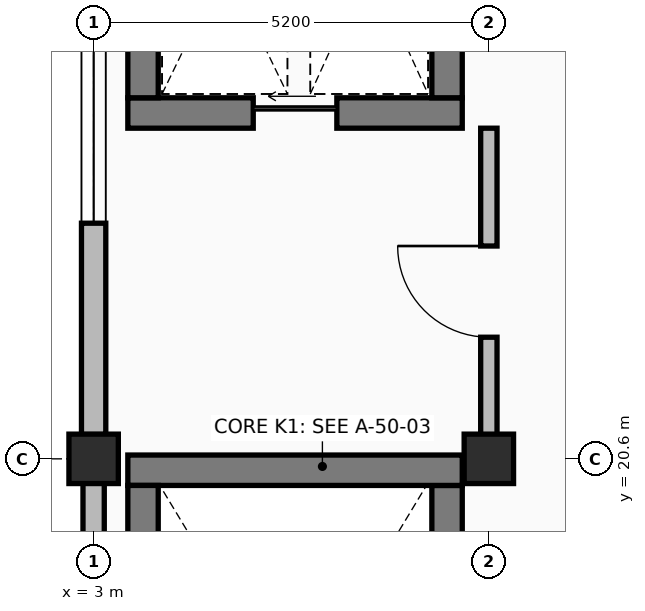
"""IFC4 building model, lengths in metres.
Left out: names, types, materials, properties, quantities, classifications, styles, units other than length and angle.
Written with IfcOpenShell. Run it as: python <this file> out.ifc"""

import sys

from ifc_helpers import new_model, si_unit, direction, frame, frame_2d, origin, origin_2d, place, context, subcontext, project, spatial, rectangle, extrude, element, fill, save


model = new_model("IFC4")
c1 = context("Model", 3, precision=1e-05, world=origin(), true_north=direction((0.0, 1.0)))
c2 = subcontext(c1, "Body", "Model", "MODEL_VIEW")
j1 = project(units=[si_unit("LENGTHUNIT", "METRE"), si_unit("PLANEANGLEUNIT", "RADIAN")], contexts=[c1])
p1 = place(None, origin())
s1 = spatial("IfcSite", under=j1, at=p1, CompositionType="ELEMENT")
p2 = place(p1, origin())
s2 = spatial("IfcBuilding", under=s1, at=p2, CompositionType="ELEMENT")
p3 = place(p2, frame((0.0, 0.0, 9.6)))
s3 = spatial("IfcBuildingStorey", under=s2, at=p3, CompositionType="ELEMENT", Elevation=9.6)
for number, where, z_axis, x_axis in (
    (1, (3.0, 20.6, 0.0), (0.0, 0.0, 1.0), (1.0, 0.0, 0.0)),
    (2, (8.2, 20.6, 0.0), (0.0, 0.0, 1.0), (1.0, 0.0, 0.0)),
):
    element("IfcColumn", number, at=place(p3, frame(where, z_axis=z_axis, x_axis=x_axis)), inside=s3, PredefinedType="COLUMN", context=c2, shape_type="SweptSolid", body=[
        extrude(rectangle(XDim=0.65, YDim=0.65, at=origin_2d()), origin(), (0.0, 0.0, 1.0), 4.8),
    ])
p4 = place(p3, frame((3.0, 20.28, 0.0), z_axis=(0.0, 0.0, 1.0), x_axis=(0.0, -1.0, 0.0)))
e3 = element("IfcWall", 3, at=p4, inside=s3, PredefinedType="SOLIDWALL", context=c2, shape_type="SweptSolid", body=[
    extrude(rectangle(XDim=3.86, YDim=0.28, at=frame_2d((1.93, 0.0))), origin(), (0.0, 0.0, 1.0), 3.71),
])
p5 = place(p4, frame((0.73, 0.0, 0.9)))
e4 = element("IfcOpeningElement", 4, at=p5, cuts=e3, PredefinedType="OPENING", context=c2, shape_type="SweptSolid", body=[
    extrude(rectangle(XDim=2.4, YDim=1.5, at=frame_2d((1.2, 0.75))), frame((0.0, 0.15, 0.0), z_axis=(0.0, -1.0, 0.0), x_axis=(1.0, 0.0, 0.0)), (0.0, 0.0, 1.0), 0.3),
])
p6 = place(p3, frame((3.0, 29.08, 0.0), z_axis=(0.0, 0.0, 1.0), x_axis=(0.0, -1.0, 0.0)))
e5 = element("IfcWall", 5, at=p6, inside=s3, PredefinedType="SOLIDWALL", context=c2, shape_type="SweptSolid", body=[
    extrude(rectangle(XDim=8.16, YDim=0.32, at=frame_2d((4.08, 0.0))), origin(), (0.0, 0.0, 1.0), 3.71),
])
p7 = place(p6, frame((2.78, 0.0, 0.9)))
e6 = element("IfcOpeningElement", 6, at=p7, cuts=e5, PredefinedType="OPENING", context=c2, shape_type="SweptSolid", body=[
    extrude(rectangle(XDim=2.6, YDim=1.55, at=frame_2d((1.3, 0.775))), frame((0.0, 0.17, 0.0), z_axis=(0.0, -1.0, 0.0), x_axis=(1.0, 0.0, 0.0)), (0.0, 0.0, 1.0), 0.34),
])
p8 = place(p3, frame((7.65, 12.6, 0.0), z_axis=(0.0, 0.0, 1.0), x_axis=(0.0, 1.0, 0.0)))
e7 = element("IfcWall", 7, at=p8, inside=s3, PredefinedType="SHEAR", context=c2, shape_type="SweptSolid", body=[
    extrude(rectangle(XDim=7.65, YDim=0.4, at=frame_2d((3.825, 0.0))), origin(), (0.0, 0.0, 1.0), 4.49),
])
p9 = place(p8, frame((0.4, 0.0, 0.0)))
e8 = element("IfcOpeningElement", 8, at=p9, cuts=e7, PredefinedType="OPENING", context=c2, shape_type="SweptSolid", body=[
    extrude(rectangle(XDim=1.1, YDim=2.2, at=frame_2d((0.55, 1.1))), frame((0.0, 0.21, 0.0), z_axis=(0.0, -1.0, 0.0), x_axis=(1.0, 0.0, 0.0)), (0.0, 0.0, 1.0), 0.42),
])
p10 = place(p3, frame((7.85, 20.45, 0.0), z_axis=(0.0, 0.0, 1.0), x_axis=(-1.0, 0.0, 0.0)))
e9 = element("IfcWall", 9, at=p10, inside=s3, PredefinedType="SHEAR", context=c2, shape_type="SweptSolid", body=[
    extrude(rectangle(XDim=4.4, YDim=0.4, at=frame_2d((2.2, 0.0))), origin(), (0.0, 0.0, 1.0), 4.49),
])
p11 = place(p3, frame((3.65, 20.25, 0.0), z_axis=(0.0, 0.0, 1.0), x_axis=(0.0, -1.0, 0.0)))
e10 = element("IfcWall", 10, at=p11, inside=s3, PredefinedType="SHEAR", context=c2, shape_type="SweptSolid", body=[
    extrude(rectangle(XDim=7.65, YDim=0.4, at=frame_2d((3.825, 0.0))), origin(), (0.0, 0.0, 1.0), 4.49),
])
p12 = place(p3, frame((3.45, 25.15, 0.0), z_axis=(0.0, 0.0, 1.0), x_axis=(1.0, 0.0, 0.0)))
e11 = element("IfcWall", 11, at=p12, inside=s3, PredefinedType="SHEAR", context=c2, shape_type="SweptSolid", body=[
    extrude(rectangle(XDim=4.4, YDim=0.4, at=frame_2d((2.2, 0.0))), origin(), (0.0, 0.0, 1.0), 4.49),
])
p13 = place(p12, frame((1.65, 0.0, 0.0)))
e12 = element("IfcOpeningElement", 12, at=p13, cuts=e11, PredefinedType="OPENING", context=c2, shape_type="SweptSolid", body=[
    extrude(rectangle(XDim=1.1, YDim=2.2, at=frame_2d((0.55, 1.1))), frame((0.0, 0.21, 0.0), z_axis=(0.0, -1.0, 0.0), x_axis=(1.0, 0.0, 0.0)), (0.0, 0.0, 1.0), 0.42),
])
for number, where, z_axis, x_axis in (
    (13, (7.65, 25.35, 0.0), (0.0, 0.0, 1.0), (0.0, 1.0, 0.0)),
    (14, (3.65, 28.85, 0.0), (0.0, 0.0, 1.0), (0.0, -1.0, 0.0)),
):
    element("IfcWall", number, at=place(p3, frame(where, z_axis=z_axis, x_axis=x_axis)), inside=s3, PredefinedType="SHEAR", context=c2, shape_type="SweptSolid", body=[
        extrude(rectangle(XDim=3.5, YDim=0.4, at=frame_2d((1.75, 0.0))), origin(), (0.0, 0.0, 1.0), 4.49),
    ])
p14 = place(p3, frame((8.2, 20.65, 0.0), z_axis=(0.0, 0.0, 1.0), x_axis=(0.0, 1.0, 0.0)))
e15 = element("IfcWall", 15, at=p14, inside=s3, PredefinedType="PARTITIONING", context=c2, shape_type="SweptSolid", body=[
    extrude(rectangle(XDim=4.3, YDim=0.215, at=frame_2d((2.15, 0.0))), origin(), (0.0, 0.0, 1.0), 3.6),
])
p15 = place(p14, frame((1.55, 0.0, 0.0)))
e16 = element("IfcOpeningElement", 16, at=p15, cuts=e15, PredefinedType="OPENING", context=c2, shape_type="SweptSolid", body=[
    extrude(rectangle(XDim=1.2, YDim=2.2, at=frame_2d((0.6, 1.1))), frame((0.0, 0.117, 0.0), z_axis=(0.0, -1.0, 0.0), x_axis=(1.0, 0.0, 0.0)), (0.0, 0.0, 1.0), 0.235),
])
p16 = place(p7, origin())
e17 = element("IfcWindow", 17, at=p16, inside=s3, PartitioningType="SINGLE_PANEL", PredefinedType="WINDOW", context=c2, shape_type="SweptSolid", body=[
    extrude(rectangle(XDim=2.6, YDim=1.55, at=frame_2d((1.3, 0.775))), frame((0.0, 0.03, 0.0), z_axis=(0.0, -1.0, 0.0), x_axis=(1.0, 0.0, 0.0)), (0.0, 0.0, 1.0), 0.06),
])
fill(e6, e17)
p17 = place(p13, origin())
e18 = element("IfcDoor", 18, at=p17, inside=s3, OperationType="SLIDING_TO_LEFT", PredefinedType="DOOR", context=c2, shape_type="SweptSolid", body=[
    extrude(rectangle(XDim=1.1, YDim=2.2, at=frame_2d((0.55, 1.1))), frame((0.0, 0.025, 0.0), z_axis=(0.0, -1.0, 0.0), x_axis=(1.0, 0.0, 0.0)), (0.0, 0.0, 1.0), 0.05),
])
fill(e12, e18)
p18 = place(p15, origin())
e19 = element("IfcDoor", 19, at=p18, inside=s3, OperationType="SINGLE_SWING_RIGHT", PredefinedType="DOOR", context=c2, shape_type="SweptSolid", body=[
    extrude(rectangle(XDim=1.2, YDim=2.2, at=frame_2d((0.6, 1.1))), frame((0.0, 0.025, 0.0), z_axis=(0.0, -1.0, 0.0), x_axis=(1.0, 0.0, 0.0)), (0.0, 0.0, 1.0), 0.05),
])
fill(e16, e19)
save(model, sys.argv[1])
